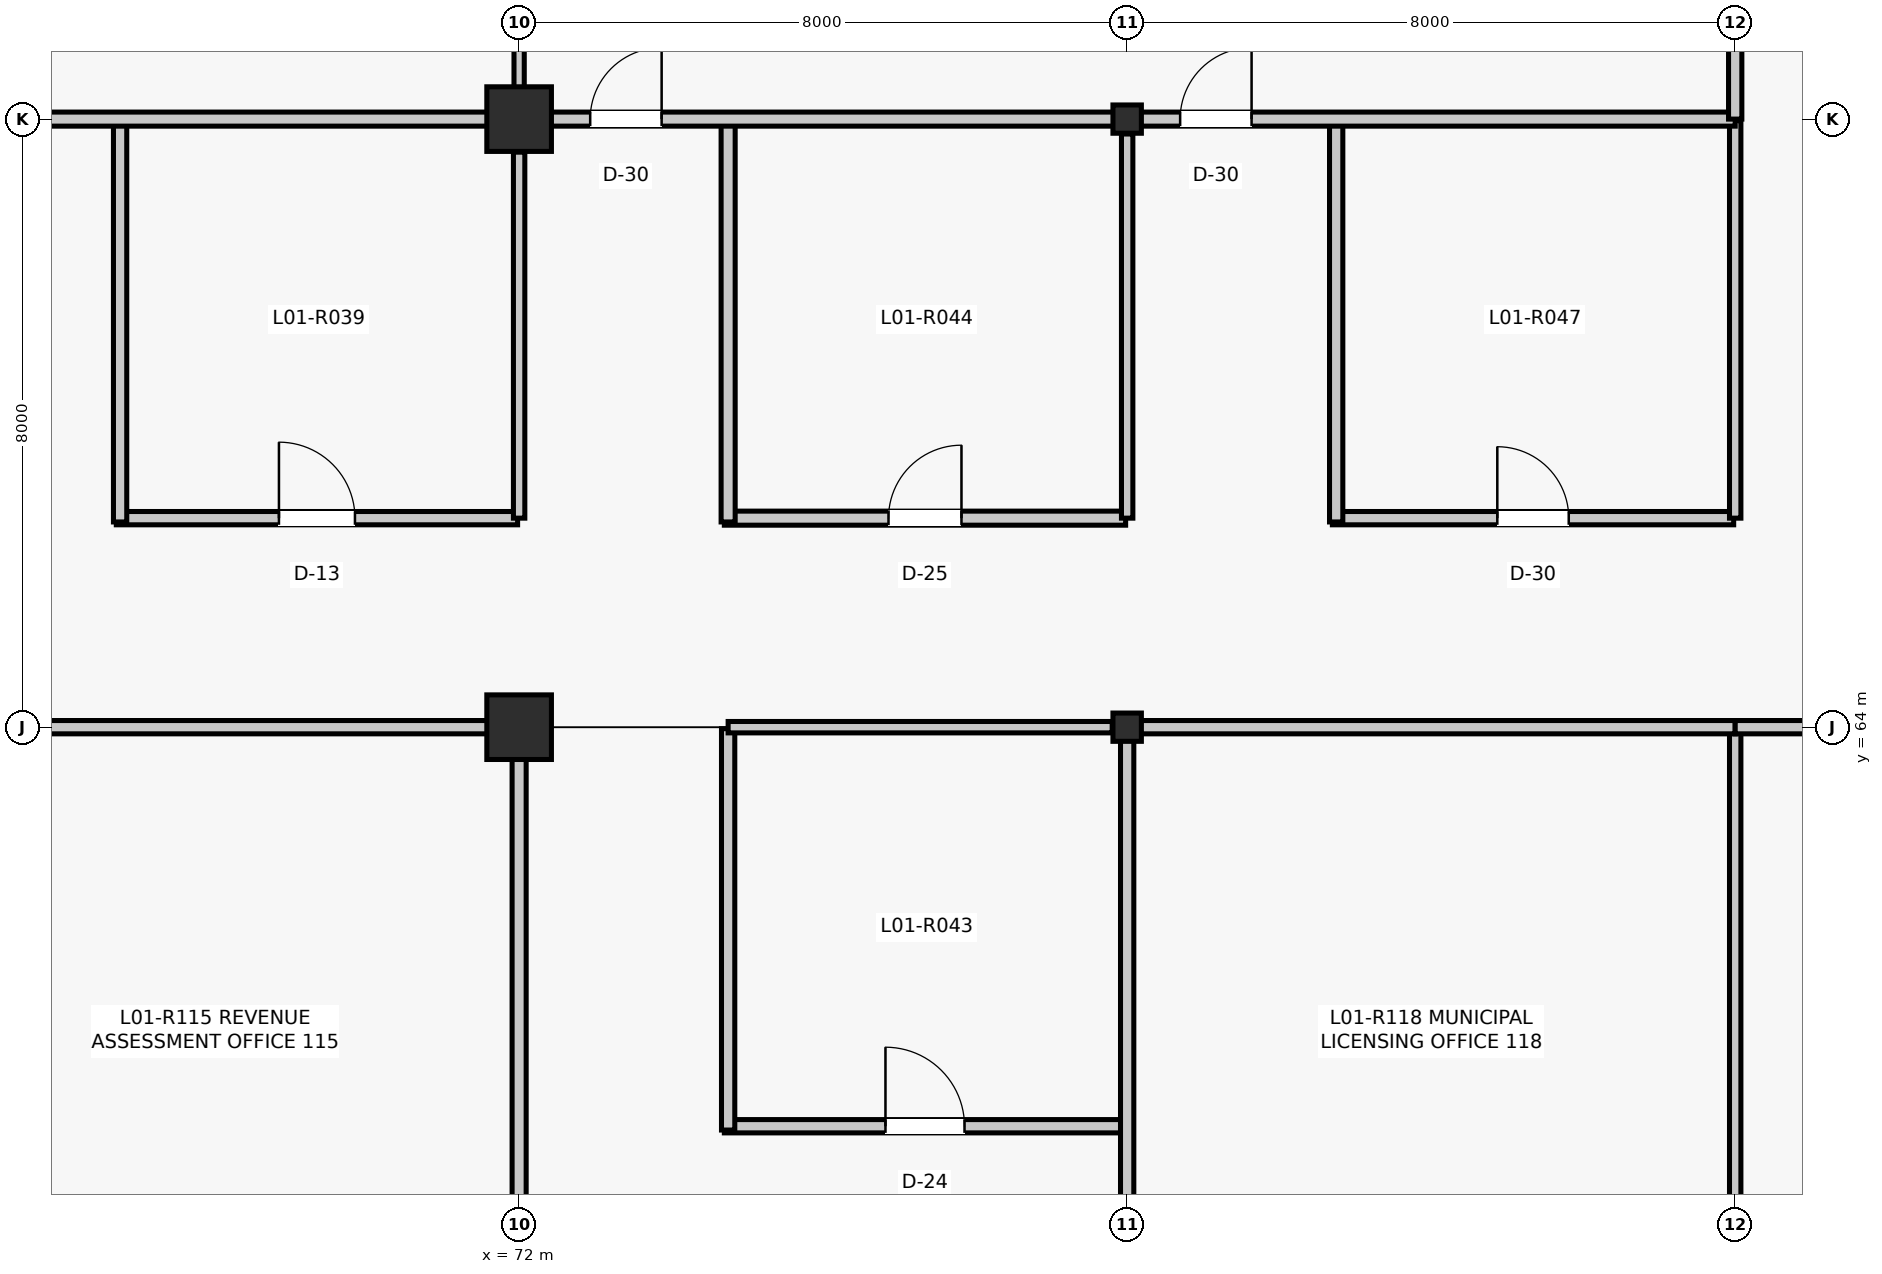
"""IFC4 building model, lengths in metres.
Left out: names, types, materials, properties, quantities, classifications, styles, units other than length and angle.
Written with IfcOpenShell. Run it as: python <this file> out.ifc"""

import sys

from ifc_helpers import new_model, si_unit, direction, frame, frame_2d, origin, origin_2d, place, context, subcontext, project, spatial, rectangle, i_section, extrude, element, fill, save


model = new_model("IFC4")
c1 = context("Model", 3, precision=1e-05, world=origin(), true_north=direction((0.0, 1.0)))
c2 = subcontext(c1, "Body", "Model", "MODEL_VIEW")
j1 = project(units=[si_unit("LENGTHUNIT", "METRE"), si_unit("PLANEANGLEUNIT", "RADIAN")], contexts=[c1])
p1 = place(None, origin())
s1 = spatial("IfcSite", under=j1, at=p1, CompositionType="ELEMENT")
p2 = place(p1, origin())
s2 = spatial("IfcBuilding", under=s1, at=p2, CompositionType="ELEMENT")
p3 = place(p2, frame((0.0, 0.0, 5.28)))
s3 = spatial("IfcBuildingStorey", under=s2, at=p3, CompositionType="ELEMENT", Elevation=5.28)
for number, where, z_axis, x_axis in (
    (1, (72.0, 64.0, 0.0), (0.0, 0.0, 1.0), (1.0, 0.0, 0.0)),
    (2, (72.0, 72.0, 0.0), (0.0, 0.0, 1.0), (1.0, 0.0, 0.0)),
):
    element("IfcColumn", number, at=place(p3, frame(where, z_axis=z_axis, x_axis=x_axis)), inside=s3, PredefinedType="COLUMN", context=c2, shape_type="SweptSolid", body=[
        extrude(rectangle(XDim=0.85, YDim=0.85, at=origin_2d()), origin(), (0.0, 0.0, 1.0), 4.62),
    ])
for number, where, z_axis, x_axis in (
    (3, (80.0, 64.0, 0.0), (0.0, 0.0, 1.0), (1.0, 0.0, 0.0)),
    (4, (80.0, 72.0, 0.0), (0.0, 0.0, 1.0), (1.0, 0.0, 0.0)),
):
    element("IfcColumn", number, at=place(p3, frame(where, z_axis=z_axis, x_axis=x_axis)), inside=s3, PredefinedType="COLUMN", context=c2, shape_type="SweptSolid", body=[
        extrude(i_section(OverallWidth=0.374, OverallDepth=0.372, WebThickness=0.016, FlangeThickness=0.026, FilletRadius=0.015, at=origin_2d()), origin(), (0.0, 0.0, 1.0), 4.62),
    ])
p4 = place(p3, frame((66.7, 66.75, 0.0), z_axis=(0.0, 0.0, 1.0), x_axis=(1.0, 0.0, 0.0)))
e5 = element("IfcWall", 5, at=p4, inside=s3, PredefinedType="PARTITIONING", context=c2, shape_type="SweptSolid", body=[
    extrude(rectangle(XDim=5.28, YDim=0.175, at=frame_2d((2.64, 0.0))), origin(), (0.0, 0.0, 1.0), 3.857),
])
p5 = place(p4, frame((2.14, 0.0, 0.0)))
e6 = element("IfcOpeningElement", 6, at=p5, cuts=e5, PredefinedType="OPENING", context=c2, shape_type="SweptSolid", body=[
    extrude(rectangle(XDim=1.0, YDim=2.15, at=frame_2d((0.5, 1.075))), frame((0.0, 0.097, 0.0), z_axis=(0.0, -1.0, 0.0), x_axis=(1.0, 0.0, 0.0)), (0.0, 0.0, 1.0), 0.195),
])
p6 = place(p3, frame((66.75, 66.7, 0.0), z_axis=(0.0, 0.0, 1.0), x_axis=(0.0, 1.0, 0.0)))
e7 = element("IfcWall", 7, at=p6, inside=s3, PredefinedType="PARTITIONING", context=c2, shape_type="SweptSolid", body=[
    extrude(rectangle(XDim=5.28, YDim=0.175, at=frame_2d((2.64, 0.0))), origin(), (0.0, 0.0, 1.0), 3.787),
])
p7 = place(p3, frame((72.0, 66.75, 0.0), z_axis=(0.0, 0.0, 1.0), x_axis=(0.0, 1.0, 0.0)))
e8 = element("IfcWall", 8, at=p7, inside=s3, PredefinedType="PARTITIONING", context=c2, shape_type="SweptSolid", body=[
    extrude(rectangle(XDim=4.815, YDim=0.15, at=frame_2d((2.407, 0.0))), origin(), (0.0, 0.0, 1.0), 3.857),
])
p8 = place(p3, frame((74.7, 58.75, 0.0), z_axis=(0.0, 0.0, 1.0), x_axis=(1.0, 0.0, 0.0)))
e9 = element("IfcWall", 9, at=p8, inside=s3, PredefinedType="PARTITIONING", context=c2, shape_type="SweptSolid", body=[
    extrude(rectangle(XDim=5.28, YDim=0.175, at=frame_2d((2.64, 0.0))), origin(), (0.0, 0.0, 1.0), 3.857),
])
p9 = place(p8, frame((2.12, 0.0, 0.0)))
e10 = element("IfcOpeningElement", 10, at=p9, cuts=e9, PredefinedType="OPENING", context=c2, shape_type="SweptSolid", body=[
    extrude(rectangle(XDim=1.04, YDim=2.18, at=frame_2d((0.52, 1.09))), frame((0.0, 0.097, 0.0), z_axis=(0.0, -1.0, 0.0), x_axis=(1.0, 0.0, 0.0)), (0.0, 0.0, 1.0), 0.195),
])
p10 = place(p3, frame((74.75, 58.7, 0.0), z_axis=(0.0, 0.0, 1.0), x_axis=(0.0, 1.0, 0.0)))
e11 = element("IfcWall", 11, at=p10, inside=s3, PredefinedType="PARTITIONING", context=c2, shape_type="SweptSolid", body=[
    extrude(rectangle(XDim=5.28, YDim=0.175, at=frame_2d((2.64, 0.0))), origin(), (0.0, 0.0, 1.0), 3.787),
])
p11 = place(p3, frame((74.75, 64.0, 0.0), z_axis=(0.0, 0.0, 1.0), x_axis=(1.0, 0.0, 0.0)))
e12 = element("IfcWall", 12, at=p11, inside=s3, PredefinedType="PARTITIONING", context=c2, shape_type="SweptSolid", body=[
    extrude(rectangle(XDim=5.053, YDim=0.15, at=frame_2d((2.526, 0.0))), origin(), (0.0, 0.0, 1.0), 3.787),
])
p12 = place(p3, frame((74.7, 66.75, 0.0), z_axis=(0.0, 0.0, 1.0), x_axis=(1.0, 0.0, 0.0)))
e13 = element("IfcWall", 13, at=p12, inside=s3, PredefinedType="PARTITIONING", context=c2, shape_type="SweptSolid", body=[
    extrude(rectangle(XDim=5.28, YDim=0.185, at=frame_2d((2.64, 0.0))), origin(), (0.0, 0.0, 1.0), 3.781),
])
p13 = place(p12, frame((2.16, 0.0, 0.0)))
e14 = element("IfcOpeningElement", 14, at=p13, cuts=e13, PredefinedType="OPENING", context=c2, shape_type="SweptSolid", body=[
    extrude(rectangle(XDim=0.96, YDim=2.14, at=frame_2d((0.48, 1.07))), frame((0.0, 0.103, 0.0), z_axis=(0.0, -1.0, 0.0), x_axis=(1.0, 0.0, 0.0)), (0.0, 0.0, 1.0), 0.205),
])
p14 = place(p3, frame((74.75, 66.7, 0.0), z_axis=(0.0, 0.0, 1.0), x_axis=(0.0, 1.0, 0.0)))
e15 = element("IfcWall", 15, at=p14, inside=s3, PredefinedType="PARTITIONING", context=c2, shape_type="SweptSolid", body=[
    extrude(rectangle(XDim=5.28, YDim=0.185, at=frame_2d((2.64, 0.0))), origin(), (0.0, 0.0, 1.0), 3.771),
])
p15 = place(p3, frame((80.0, 66.75, 0.0), z_axis=(0.0, 0.0, 1.0), x_axis=(0.0, 1.0, 0.0)))
e16 = element("IfcWall", 16, at=p15, inside=s3, PredefinedType="PARTITIONING", context=c2, shape_type="SweptSolid", body=[
    extrude(rectangle(XDim=5.054, YDim=0.15, at=frame_2d((2.527, 0.0))), origin(), (0.0, 0.0, 1.0), 3.781),
])
p16 = place(p3, frame((82.7, 66.75, 0.0), z_axis=(0.0, 0.0, 1.0), x_axis=(1.0, 0.0, 0.0)))
e17 = element("IfcWall", 17, at=p16, inside=s3, PredefinedType="PARTITIONING", context=c2, shape_type="SweptSolid", body=[
    extrude(rectangle(XDim=5.28, YDim=0.175, at=frame_2d((2.64, 0.0))), origin(), (0.0, 0.0, 1.0), 4.325),
])
p17 = place(p16, frame((2.17, 0.0, 0.0)))
e18 = element("IfcOpeningElement", 18, at=p17, cuts=e17, PredefinedType="OPENING", context=c2, shape_type="SweptSolid", body=[
    extrude(rectangle(XDim=0.94, YDim=2.12, at=frame_2d((0.47, 1.06))), frame((0.0, 0.097, 0.0), z_axis=(0.0, -1.0, 0.0), x_axis=(1.0, 0.0, 0.0)), (0.0, 0.0, 1.0), 0.195),
])
p18 = place(p3, frame((82.75, 66.7, 0.0), z_axis=(0.0, 0.0, 1.0), x_axis=(0.0, 1.0, 0.0)))
e19 = element("IfcWall", 19, at=p18, inside=s3, PredefinedType="PARTITIONING", context=c2, shape_type="SweptSolid", body=[
    extrude(rectangle(XDim=5.28, YDim=0.175, at=frame_2d((2.64, 0.0))), origin(), (0.0, 0.0, 1.0), 3.397),
])
p19 = place(p3, frame((88.0, 66.75, 0.0), z_axis=(0.0, 0.0, 1.0), x_axis=(0.0, 1.0, 0.0)))
e20 = element("IfcWall", 20, at=p19, inside=s3, PredefinedType="PARTITIONING", context=c2, shape_type="SweptSolid", body=[
    extrude(rectangle(XDim=5.23, YDim=0.15, at=frame_2d((2.615, 0.0))), origin(), (0.0, 0.0, 1.0), 3.397),
])
p20 = place(p3, frame((72.0, 56.415, 0.0), z_axis=(0.0, 0.0, 1.0), x_axis=(0.0, 1.0, 0.0)))
e21 = element("IfcWall", 21, at=p20, inside=s3, PredefinedType="PARTITIONING", context=c2, shape_type="SweptSolid", body=[
    extrude(rectangle(XDim=7.17, YDim=0.185, at=frame_2d((3.585, 0.0))), origin(), (0.0, 0.0, 1.0), 3.787),
])
p21 = place(p3, frame((64.29, 64.0, 0.0), z_axis=(0.0, 0.0, 1.0), x_axis=(1.0, 0.0, 0.0)))
e22 = element("IfcWall", 22, at=p21, inside=s3, PredefinedType="PARTITIONING", context=c2, shape_type="SweptSolid", body=[
    extrude(rectangle(XDim=7.295, YDim=0.175, at=frame_2d((3.647, 0.0))), origin(), (0.0, 0.0, 1.0), 3.712),
])
p22 = place(p3, frame((64.29, 72.0, 0.0), z_axis=(0.0, 0.0, 1.0), x_axis=(1.0, 0.0, 0.0)))
e23 = element("IfcWall", 23, at=p22, inside=s3, PredefinedType="PARTITIONING", context=c2, shape_type="SweptSolid", body=[
    extrude(rectangle(XDim=7.295, YDim=0.185, at=frame_2d((3.647, 0.0))), origin(), (0.0, 0.0, 1.0), 3.787),
])
p23 = place(p22, frame((0.52, 0.0, 0.0)))
e24 = element("IfcOpeningElement", 24, at=p23, cuts=e23, PredefinedType="OPENING", context=c2, shape_type="SweptSolid", body=[
    extrude(rectangle(XDim=0.94, YDim=2.12, at=frame_2d((0.47, 1.06))), frame((0.0, 0.103, 0.0), z_axis=(0.0, -1.0, 0.0), x_axis=(1.0, 0.0, 0.0)), (0.0, 0.0, 1.0), 0.205),
])
p24 = place(p3, frame((72.0, 72.415, 0.0), z_axis=(0.0, 0.0, 1.0), x_axis=(0.0, 1.0, 0.0)))
e25 = element("IfcWall", 25, at=p24, inside=s3, PredefinedType="PARTITIONING", context=c2, shape_type="SweptSolid", body=[
    extrude(rectangle(XDim=7.17, YDim=0.135, at=frame_2d((3.585, 0.0))), origin(), (0.0, 0.0, 1.0), 3.781),
])
p25 = place(p3, frame((80.0, 56.176, 0.0), z_axis=(0.0, 0.0, 1.0), x_axis=(0.0, 1.0, 0.0)))
e26 = element("IfcWall", 26, at=p25, inside=s3, PredefinedType="PARTITIONING", context=c2, shape_type="SweptSolid", body=[
    extrude(rectangle(XDim=7.648, YDim=0.175, at=frame_2d((3.824, 0.0))), origin(), (0.0, 0.0, 1.0), 3.857),
])
p26 = place(p25, frame((0.52, 0.0, 0.0)))
e27 = element("IfcOpeningElement", 27, at=p26, cuts=e26, PredefinedType="OPENING", context=c2, shape_type="SweptSolid", body=[
    extrude(rectangle(XDim=0.94, YDim=2.12, at=frame_2d((0.47, 1.06))), frame((0.0, 0.097, 0.0), z_axis=(0.0, -1.0, 0.0), x_axis=(1.0, 0.0, 0.0)), (0.0, 0.0, 1.0), 0.195),
])
p27 = place(p3, frame((72.415, 72.0, 0.0), z_axis=(0.0, 0.0, 1.0), x_axis=(1.0, 0.0, 0.0)))
e28 = element("IfcWall", 28, at=p27, inside=s3, PredefinedType="PARTITIONING", context=c2, shape_type="SweptSolid", body=[
    extrude(rectangle(XDim=7.408, YDim=0.185, at=frame_2d((3.704, 0.0))), origin(), (0.0, 0.0, 1.0), 3.771),
])
p28 = place(p27, frame((0.52, 0.0, 0.0)))
e29 = element("IfcOpeningElement", 29, at=p28, cuts=e28, PredefinedType="OPENING", context=c2, shape_type="SweptSolid", body=[
    extrude(rectangle(XDim=0.94, YDim=2.12, at=frame_2d((0.47, 1.06))), frame((0.0, 0.103, 0.0), z_axis=(0.0, -1.0, 0.0), x_axis=(1.0, 0.0, 0.0)), (0.0, 0.0, 1.0), 0.205),
])
p29 = place(p3, frame((88.0, 56.0, 0.0), z_axis=(0.0, 0.0, 1.0), x_axis=(0.0, 1.0, 0.0)))
e30 = element("IfcWall", 30, at=p29, inside=s3, PredefinedType="PARTITIONING", context=c2, shape_type="SweptSolid", body=[
    extrude(rectangle(XDim=8.0, YDim=0.15, at=frame_2d((4.0, 0.0))), origin(), (0.0, 0.0, 1.0), 3.55),
])
p30 = place(p3, frame((80.177, 64.0, 0.0), z_axis=(0.0, 0.0, 1.0), x_axis=(1.0, 0.0, 0.0)))
e31 = element("IfcWall", 31, at=p30, inside=s3, PredefinedType="PARTITIONING", context=c2, shape_type="SweptSolid", body=[
    extrude(rectangle(XDim=7.823, YDim=0.175, at=frame_2d((3.912, 0.0))), origin(), (0.0, 0.0, 1.0), 3.562),
])
p31 = place(p3, frame((80.177, 72.0, 0.0), z_axis=(0.0, 0.0, 1.0), x_axis=(1.0, 0.0, 0.0)))
e32 = element("IfcWall", 32, at=p31, inside=s3, PredefinedType="PARTITIONING", context=c2, shape_type="SweptSolid", body=[
    extrude(rectangle(XDim=7.823, YDim=0.185, at=frame_2d((3.912, 0.0))), origin(), (0.0, 0.0, 1.0), 3.397),
])
p32 = place(p31, frame((0.52, 0.0, 0.0)))
e33 = element("IfcOpeningElement", 33, at=p32, cuts=e32, PredefinedType="OPENING", context=c2, shape_type="SweptSolid", body=[
    extrude(rectangle(XDim=0.94, YDim=2.12, at=frame_2d((0.47, 1.06))), frame((0.0, 0.103, 0.0), z_axis=(0.0, -1.0, 0.0), x_axis=(1.0, 0.0, 0.0)), (0.0, 0.0, 1.0), 0.205),
])
p33 = place(p3, frame((88.0, 72.0, 0.0), z_axis=(0.0, 0.0, 1.0), x_axis=(0.0, 1.0, 0.0)))
e34 = element("IfcWall", 34, at=p33, inside=s3, PredefinedType="PARTITIONING", context=c2, shape_type="SweptSolid", body=[
    extrude(rectangle(XDim=7.71, YDim=0.175, at=frame_2d((3.855, 0.0))), origin(), (0.0, 0.0, 1.0), 3.397),
])
p34 = place(p33, frame((2.905, 0.0, 0.0)))
e35 = element("IfcOpeningElement", 35, at=p34, cuts=e34, PredefinedType="OPENING", context=c2, shape_type="SweptSolid", body=[
    extrude(rectangle(XDim=1.9, YDim=2.38, at=frame_2d((0.95, 1.19))), frame((0.0, 0.097, 0.0), z_axis=(0.0, -1.0, 0.0), x_axis=(1.0, 0.0, 0.0)), (0.0, 0.0, 1.0), 0.195),
])
p35 = place(p3, frame((88.0, 64.0, 0.0), z_axis=(0.0, 0.0, 1.0), x_axis=(1.0, 0.0, 0.0)))
e36 = element("IfcWall", 36, at=p35, inside=s3, PredefinedType="PARTITIONING", context=c2, shape_type="SweptSolid", body=[
    extrude(rectangle(XDim=7.823, YDim=0.175, at=frame_2d((3.912, 0.0))), origin(), (0.0, 0.0, 1.0), 3.562),
])
p36 = place(p35, frame((2.961, 0.0, 0.0)))
e37 = element("IfcOpeningElement", 37, at=p36, cuts=e36, PredefinedType="OPENING", context=c2, shape_type="SweptSolid", body=[
    extrude(rectangle(XDim=1.9, YDim=2.38, at=frame_2d((0.95, 1.19))), frame((0.0, 0.097, 0.0), z_axis=(0.0, -1.0, 0.0), x_axis=(1.0, 0.0, 0.0)), (0.0, 0.0, 1.0), 0.195),
])
p37 = place(p5, origin())
e38 = element("IfcDoor", 38, at=p37, inside=s3, OperationType="SINGLE_SWING_LEFT", PredefinedType="DOOR", context=c2, shape_type="SweptSolid", body=[
    extrude(rectangle(XDim=1.0, YDim=2.15, at=frame_2d((0.5, 1.075))), frame((0.0, 0.025, 0.0), z_axis=(0.0, -1.0, 0.0), x_axis=(1.0, 0.0, 0.0)), (0.0, 0.0, 1.0), 0.05),
])
fill(e6, e38)
p38 = place(p9, origin())
e39 = element("IfcDoor", 39, at=p38, inside=s3, OperationType="SINGLE_SWING_LEFT", PredefinedType="DOOR", context=c2, shape_type="SweptSolid", body=[
    extrude(rectangle(XDim=1.04, YDim=2.18, at=frame_2d((0.52, 1.09))), frame((0.0, 0.025, 0.0), z_axis=(0.0, -1.0, 0.0), x_axis=(1.0, 0.0, 0.0)), (0.0, 0.0, 1.0), 0.05),
])
fill(e10, e39)
p39 = place(p13, origin())
e40 = element("IfcDoor", 40, at=p39, inside=s3, OperationType="SINGLE_SWING_RIGHT", PredefinedType="DOOR", context=c2, shape_type="SweptSolid", body=[
    extrude(rectangle(XDim=0.96, YDim=2.14, at=frame_2d((0.48, 1.07))), frame((0.0, 0.025, 0.0), z_axis=(0.0, -1.0, 0.0), x_axis=(1.0, 0.0, 0.0)), (0.0, 0.0, 1.0), 0.05),
])
fill(e14, e40)
p40 = place(p17, origin())
e41 = element("IfcDoor", 41, at=p40, inside=s3, OperationType="SINGLE_SWING_LEFT", PredefinedType="DOOR", context=c2, shape_type="SweptSolid", body=[
    extrude(rectangle(XDim=0.94, YDim=2.12, at=frame_2d((0.47, 1.06))), frame((0.0, 0.025, 0.0), z_axis=(0.0, -1.0, 0.0), x_axis=(1.0, 0.0, 0.0)), (0.0, 0.0, 1.0), 0.05),
])
fill(e18, e41)
p41 = place(p28, origin())
e42 = element("IfcDoor", 42, at=p41, inside=s3, OperationType="SINGLE_SWING_RIGHT", PredefinedType="DOOR", context=c2, shape_type="SweptSolid", body=[
    extrude(rectangle(XDim=0.94, YDim=2.12, at=frame_2d((0.47, 1.06))), frame((0.0, 0.025, 0.0), z_axis=(0.0, -1.0, 0.0), x_axis=(1.0, 0.0, 0.0)), (0.0, 0.0, 1.0), 0.05),
])
fill(e29, e42)
p42 = place(p32, origin())
e43 = element("IfcDoor", 43, at=p42, inside=s3, OperationType="SINGLE_SWING_RIGHT", PredefinedType="DOOR", context=c2, shape_type="SweptSolid", body=[
    extrude(rectangle(XDim=0.94, YDim=2.12, at=frame_2d((0.47, 1.06))), frame((0.0, 0.025, 0.0), z_axis=(0.0, -1.0, 0.0), x_axis=(1.0, 0.0, 0.0)), (0.0, 0.0, 1.0), 0.05),
])
fill(e33, e43)
save(model, sys.argv[1])
